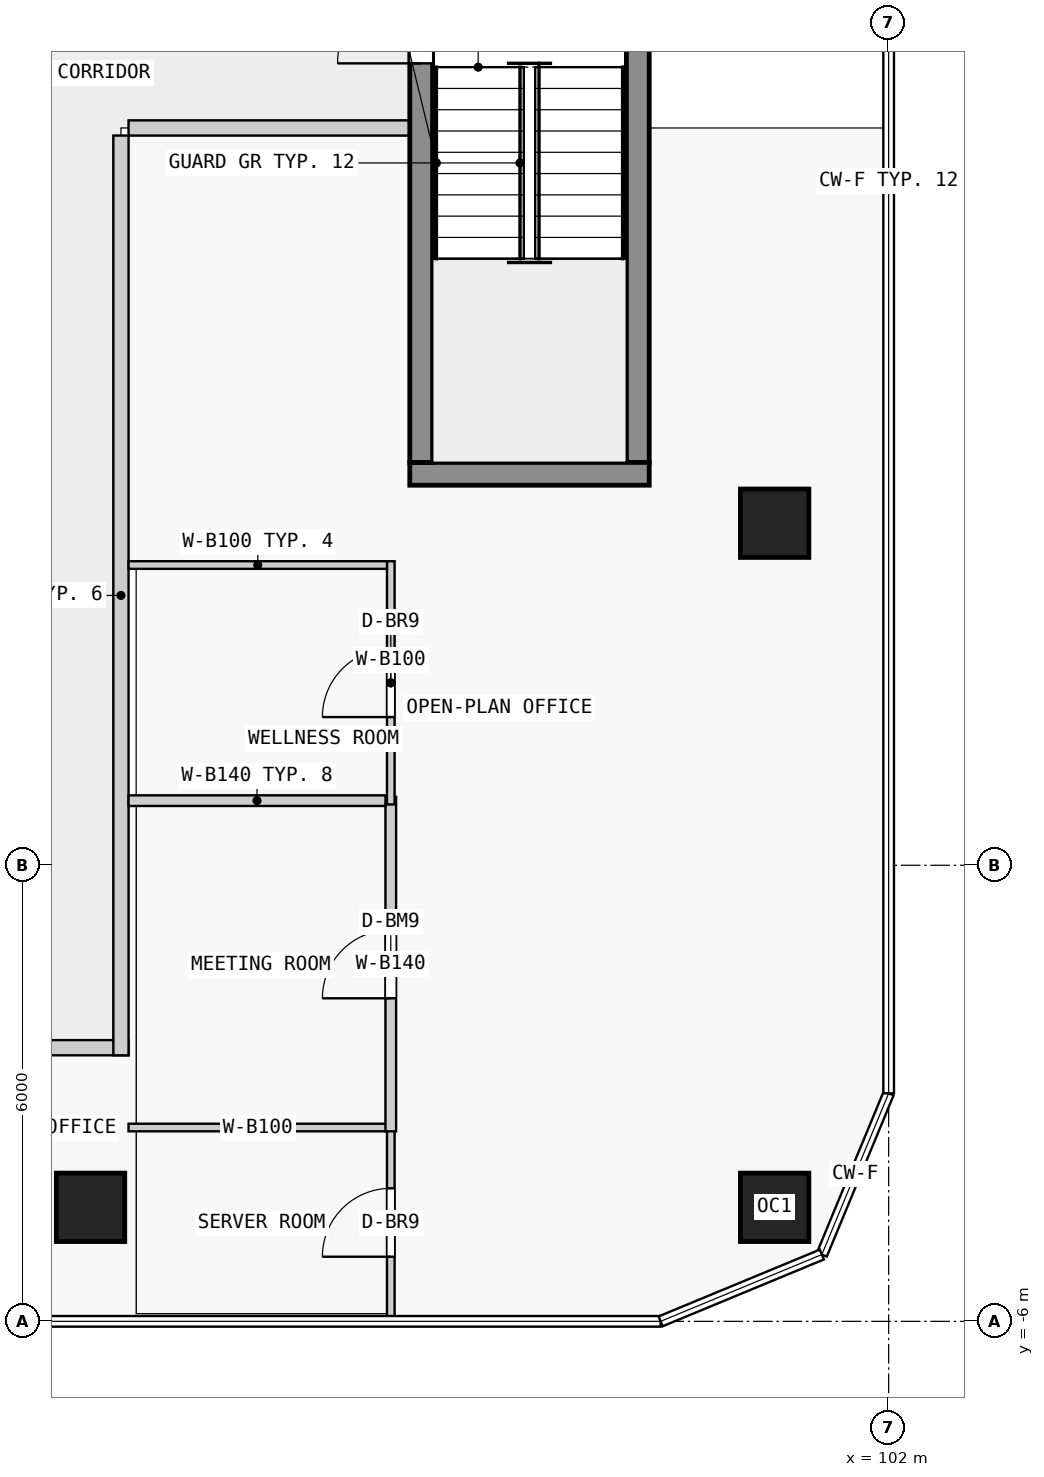
"""IFC4 building model, lengths in metres.
Left out: names, types, materials, properties, quantities, classifications, styles, units other than length and angle.
Written with IfcOpenShell. Run it as: python <this file> out.ifc"""

import sys

from ifc_helpers import new_model, si_unit, direction, frame, frame_2d, origin, origin_2d, place, context, subcontext, project, spatial, rectangle, extrude, element, fill, save


model = new_model("IFC4")
c1 = context("Model", 3, precision=1e-05, world=origin(), true_north=direction((0.0, 1.0)))
c2 = subcontext(c1, "Body", "Model", "MODEL_VIEW")
j1 = project(units=[si_unit("LENGTHUNIT", "METRE"), si_unit("PLANEANGLEUNIT", "RADIAN")], contexts=[c1])
p1 = place(None, origin())
s1 = spatial("IfcSite", under=j1, at=p1, CompositionType="ELEMENT")
p2 = place(p1, origin())
s2 = spatial("IfcBuilding", under=s1, at=p2, CompositionType="ELEMENT")
p3 = place(p2, frame((0.0, 0.0, 40.8)))
s3 = spatial("IfcBuildingStorey", under=s2, at=p3, CompositionType="ELEMENT", Elevation=40.8)
for number, where, z_axis, x_axis in (
    (1, (91.5, -4.5, 0.0), (0.0, 0.0, 1.0), (1.0, 0.0, 0.0)),
    (2, (100.5, -4.5, 0.0), (0.0, 0.0, 1.0), (1.0, 0.0, 0.0)),
    (3, (100.5, 4.5, 0.0), (0.0, 0.0, 1.0), (1.0, 0.0, 0.0)),
):
    element("IfcColumn", number, at=place(p3, frame(where, z_axis=z_axis, x_axis=x_axis)), inside=s3, PredefinedType="COLUMN", context=c2, shape_type="SweptSolid", body=[
        extrude(rectangle(XDim=0.9, YDim=0.9, at=origin_2d()), origin(), (0.0, 0.0, 1.0), 3.5),
    ])
p4 = place(p3, frame((95.85, 5.3, 0.0), z_axis=(0.0, 0.0, 1.0), x_axis=(0.0, 1.0, 0.0)))
e4 = element("IfcWall", 4, at=p4, inside=s3, PredefinedType="SHEAR", context=c2, shape_type="SweptSolid", body=[
    extrude(rectangle(XDim=6.4, YDim=0.3, at=frame_2d((3.2, 0.0))), origin(), (0.0, 0.0, 1.0), 3.25),
])
p5 = place(p4, frame((5.25, 0.0, 0.0)))
e5 = element("IfcOpeningElement", 5, at=p5, cuts=e4, PredefinedType="OPENING", context=c2, shape_type="SweptSolid", body=[
    extrude(rectangle(XDim=1.1, YDim=2.1, at=frame_2d((0.55, 1.05))), frame((0.0, 0.16, 0.0), z_axis=(0.0, -1.0, 0.0), x_axis=(1.0, 0.0, 0.0)), (0.0, 0.0, 1.0), 0.32),
])
p6 = place(p3, frame((98.7, 5.3, 0.0), z_axis=(0.0, 0.0, 1.0), x_axis=(0.0, 1.0, 0.0)))
e6 = element("IfcWall", 6, at=p6, inside=s3, PredefinedType="SHEAR", context=c2, shape_type="SweptSolid", body=[
    extrude(rectangle(XDim=6.4, YDim=0.3, at=frame_2d((3.2, 0.0))), origin(), (0.0, 0.0, 1.0), 3.25),
])
p7 = place(p3, frame((95.7, 5.15, 0.0), z_axis=(0.0, 0.0, 1.0), x_axis=(1.0, 0.0, 0.0)))
e7 = element("IfcWall", 7, at=p7, inside=s3, PredefinedType="SHEAR", context=c2, shape_type="SweptSolid", body=[
    extrude(rectangle(XDim=3.15, YDim=0.3, at=frame_2d((1.575, 0.0))), origin(), (0.0, 0.0, 1.0), 3.25),
])
p8 = place(p3, frame((72.0, -2.4, 0.0), z_axis=(0.0, 0.0, 1.0), x_axis=(1.0, 0.0, 0.0)))
e8 = element("IfcWall", 8, at=p8, inside=s3, PredefinedType="PARTITIONING", context=c2, shape_type="SweptSolid", body=[
    extrude(rectangle(XDim=20.0, YDim=0.2, at=frame_2d((10.0, 0.0))), origin(), (0.0, 0.0, 1.0), 3.25),
])
p9 = place(p8, frame((11.1, 0.0, 0.0)))
e9 = element("IfcOpeningElement", 9, at=p9, cuts=e8, PredefinedType="OPENING", context=c2, shape_type="SweptSolid", body=[
    extrude(rectangle(XDim=1.8, YDim=2.1, at=frame_2d((0.9, 1.05))), frame((0.0, 0.11, 0.0), z_axis=(0.0, -1.0, 0.0), x_axis=(1.0, 0.0, 0.0)), (0.0, 0.0, 1.0), 0.22),
])
p10 = place(p3, frame((91.9, -2.5, 0.0), z_axis=(0.0, 0.0, 1.0), x_axis=(0.0, 1.0, 0.0)))
e10 = element("IfcWall", 10, at=p10, inside=s3, PredefinedType="PARTITIONING", context=c2, shape_type="SweptSolid", body=[
    extrude(rectangle(XDim=12.1, YDim=0.2, at=frame_2d((6.05, 0.0))), origin(), (0.0, 0.0, 1.0), 3.25),
])
p11 = place(p3, frame((92.0, 9.7, 0.0), z_axis=(0.0, 0.0, 1.0), x_axis=(1.0, 0.0, 0.0)))
e11 = element("IfcWall", 11, at=p11, inside=s3, PredefinedType="PARTITIONING", context=c2, shape_type="SweptSolid", body=[
    extrude(rectangle(XDim=3.7, YDim=0.2, at=frame_2d((1.85, 0.0))), origin(), (0.0, 0.0, 1.0), 3.25),
])
p12 = place(p3, frame((95.45, -6.0, 0.0), z_axis=(0.0, 0.0, 1.0), x_axis=(0.0, 1.0, 0.0)))
e12 = element("IfcWall", 12, at=p12, inside=s3, PredefinedType="PARTITIONING", context=c2, shape_type="SweptSolid", body=[
    extrude(rectangle(XDim=2.6, YDim=0.1, at=frame_2d((1.3, 0.0))), origin(), (0.0, 0.0, 1.0), 3.25),
])
p13 = place(p12, frame((0.85, 0.0, 0.0)))
e13 = element("IfcOpeningElement", 13, at=p13, cuts=e12, PredefinedType="OPENING", context=c2, shape_type="SweptSolid", body=[
    extrude(rectangle(XDim=0.9, YDim=2.1, at=frame_2d((0.45, 1.05))), frame((0.0, 0.06, 0.0), z_axis=(0.0, -1.0, 0.0), x_axis=(1.0, 0.0, 0.0)), (0.0, 0.0, 1.0), 0.12),
])
p14 = place(p3, frame((92.0, -3.45, 0.0), z_axis=(0.0, 0.0, 1.0), x_axis=(1.0, 0.0, 0.0)))
e14 = element("IfcWall", 14, at=p14, inside=s3, PredefinedType="PARTITIONING", context=c2, shape_type="SweptSolid", body=[
    extrude(rectangle(XDim=3.4, YDim=0.1, at=frame_2d((1.7, 0.0))), origin(), (0.0, 0.0, 1.0), 3.25),
])
p15 = place(p3, frame((95.45, -3.5, 0.0), z_axis=(0.0, 0.0, 1.0), x_axis=(0.0, 1.0, 0.0)))
e15 = element("IfcWall", 15, at=p15, inside=s3, PredefinedType="PARTITIONING", context=c2, shape_type="SweptSolid", body=[
    extrude(rectangle(XDim=4.4, YDim=0.14, at=frame_2d((2.2, 0.0))), origin(), (0.0, 0.0, 1.0), 3.25),
])
p16 = place(p15, frame((1.75, 0.0, 0.0)))
e16 = element("IfcOpeningElement", 16, at=p16, cuts=e15, PredefinedType="OPENING", context=c2, shape_type="SweptSolid", body=[
    extrude(rectangle(XDim=0.9, YDim=2.4, at=frame_2d((0.45, 1.2))), frame((0.0, 0.08, 0.0), z_axis=(0.0, -1.0, 0.0), x_axis=(1.0, 0.0, 0.0)), (0.0, 0.0, 1.0), 0.16),
])
p17 = place(p3, frame((92.0, 0.85, 0.0), z_axis=(0.0, 0.0, 1.0), x_axis=(1.0, 0.0, 0.0)))
e17 = element("IfcWall", 17, at=p17, inside=s3, PredefinedType="PARTITIONING", context=c2, shape_type="SweptSolid", body=[
    extrude(rectangle(XDim=3.38, YDim=0.14, at=frame_2d((1.69, 0.0))), origin(), (0.0, 0.0, 1.0), 3.25),
])
p18 = place(p3, frame((95.45, 0.8, 0.0), z_axis=(0.0, 0.0, 1.0), x_axis=(0.0, 1.0, 0.0)))
e18 = element("IfcWall", 18, at=p18, inside=s3, PredefinedType="PARTITIONING", context=c2, shape_type="SweptSolid", body=[
    extrude(rectangle(XDim=3.2, YDim=0.1, at=frame_2d((1.6, 0.0))), origin(), (0.0, 0.0, 1.0), 3.25),
])
p19 = place(p18, frame((1.15, 0.0, 0.0)))
e19 = element("IfcOpeningElement", 19, at=p19, cuts=e18, PredefinedType="OPENING", context=c2, shape_type="SweptSolid", body=[
    extrude(rectangle(XDim=0.9, YDim=2.1, at=frame_2d((0.45, 1.05))), frame((0.0, 0.06, 0.0), z_axis=(0.0, -1.0, 0.0), x_axis=(1.0, 0.0, 0.0)), (0.0, 0.0, 1.0), 0.12),
])
p20 = place(p3, frame((92.0, 3.95, 0.0), z_axis=(0.0, 0.0, 1.0), x_axis=(1.0, 0.0, 0.0)))
e20 = element("IfcWall", 20, at=p20, inside=s3, PredefinedType="PARTITIONING", context=c2, shape_type="SweptSolid", body=[
    extrude(rectangle(XDim=3.4, YDim=0.1, at=frame_2d((1.7, 0.0))), origin(), (0.0, 0.0, 1.0), 3.25),
])
p21 = place(p5, origin())
e21 = element("IfcDoor", 21, at=p21, inside=s3, OperationType="SINGLE_SWING_LEFT", PredefinedType="DOOR", context=c2, shape_type="SweptSolid", body=[
    extrude(rectangle(XDim=1.1, YDim=2.1, at=frame_2d((0.55, 1.05))), frame((0.0, 0.025, 0.0), z_axis=(0.0, -1.0, 0.0), x_axis=(1.0, 0.0, 0.0)), (0.0, 0.0, 1.0), 0.05),
])
fill(e5, e21)
p22 = place(p13, origin())
e22 = element("IfcDoor", 22, at=p22, inside=s3, OperationType="SINGLE_SWING_LEFT", PredefinedType="DOOR", context=c2, shape_type="SweptSolid", body=[
    extrude(rectangle(XDim=0.9, YDim=2.1, at=frame_2d((0.45, 1.05))), frame((0.0, 0.025, 0.0), z_axis=(0.0, -1.0, 0.0), x_axis=(1.0, 0.0, 0.0)), (0.0, 0.0, 1.0), 0.05),
])
fill(e13, e22)
p23 = place(p16, origin())
e23 = element("IfcDoor", 23, at=p23, inside=s3, OperationType="SINGLE_SWING_LEFT", PredefinedType="DOOR", context=c2, shape_type="SweptSolid", body=[
    extrude(rectangle(XDim=0.9, YDim=2.4, at=frame_2d((0.45, 1.2))), frame((0.0, 0.025, 0.0), z_axis=(0.0, -1.0, 0.0), x_axis=(1.0, 0.0, 0.0)), (0.0, 0.0, 1.0), 0.05),
])
fill(e16, e23)
p24 = place(p19, origin())
e24 = element("IfcDoor", 24, at=p24, inside=s3, OperationType="SINGLE_SWING_LEFT", PredefinedType="DOOR", context=c2, shape_type="SweptSolid", body=[
    extrude(rectangle(XDim=0.9, YDim=2.1, at=frame_2d((0.45, 1.05))), frame((0.0, 0.025, 0.0), z_axis=(0.0, -1.0, 0.0), x_axis=(1.0, 0.0, 0.0)), (0.0, 0.0, 1.0), 0.05),
])
fill(e19, e24)
save(model, sys.argv[1])
